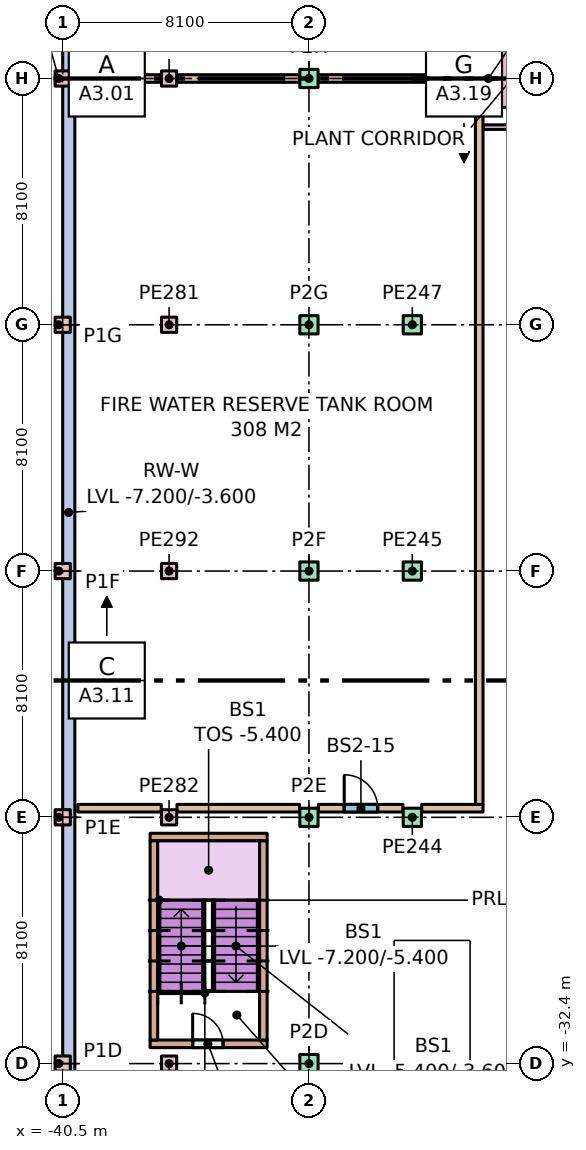
"""IFC4 building model, lengths in metres.
Left out: names, types, materials, properties, quantities, classifications, styles, units other than length and angle.
Written with IfcOpenShell. Run it as: python <this file> out.ifc"""

import sys

from ifc_helpers import new_model, si_unit, direction, frame, frame_2d, origin, origin_2d, place, context, subcontext, project, spatial, rectangle, extrude, element, fill, save


model = new_model("IFC4")
c1 = context("Model", 3, precision=1e-05, world=origin(), true_north=direction((0.0, 1.0)))
c2 = subcontext(c1, "Body", "Model", "MODEL_VIEW")
j1 = project(units=[si_unit("LENGTHUNIT", "METRE"), si_unit("PLANEANGLEUNIT", "RADIAN")], contexts=[c1])
p1 = place(None, origin())
s1 = spatial("IfcSite", under=j1, at=p1, CompositionType="ELEMENT")
p2 = place(p1, origin())
s2 = spatial("IfcBuilding", under=s1, at=p2, CompositionType="ELEMENT")
p3 = place(p2, frame((0.0, 0.0, -7.2)))
s3 = spatial("IfcBuildingStorey", under=s2, at=p3, CompositionType="ELEMENT", Elevation=-7.2)
p4 = place(p3, frame((-40.3, -56.3, 0.0), z_axis=(0.0, 0.0, 1.0), x_axis=(0.0, 1.0, 0.0)))
e1 = element("IfcWall", 1, at=p4, inside=s3, PredefinedType="SOLIDWALL", context=c2, shape_type="SweptSolid", body=[
    extrude(rectangle(XDim=112.6, YDim=0.4, at=frame_2d((56.3, 0.0))), origin(), (0.0, 0.0, 1.0), 3.6),
])
for number, where, z_axis, x_axis in (
    (2, (-40.5, -32.4, 0.0), (0.0, 0.0, 1.0), (1.0, 0.0, 0.0)),
    (3, (-40.5, -24.3, 0.0), (0.0, 0.0, 1.0), (1.0, 0.0, 0.0)),
    (4, (-40.5, -16.2, 0.0), (0.0, 0.0, 1.0), (1.0, 0.0, 0.0)),
    (5, (-40.5, -8.1, 0.0), (0.0, 0.0, 1.0), (1.0, 0.0, 0.0)),
    (6, (-40.5, 0.0, 0.0), (0.0, 0.0, 1.0), (1.0, 0.0, 0.0)),
):
    element("IfcColumn", number, at=place(p3, frame(where, z_axis=z_axis, x_axis=x_axis)), inside=s3, PredefinedType="COLUMN", context=c2, shape_type="SweptSolid", body=[
        extrude(rectangle(XDim=0.5, YDim=0.5, at=origin_2d()), origin(), (0.0, 0.0, 1.0), 3.6),
    ])
for number, where, z_axis, x_axis in (
    (7, (-32.4, -32.4, 0.0), (0.0, 0.0, 1.0), (1.0, 0.0, 0.0)),
    (8, (-32.4, -24.3, 0.0), (0.0, 0.0, 1.0), (1.0, 0.0, 0.0)),
    (9, (-32.4, -16.2, 0.0), (0.0, 0.0, 1.0), (1.0, 0.0, 0.0)),
    (10, (-32.4, -8.1, 0.0), (0.0, 0.0, 1.0), (1.0, 0.0, 0.0)),
    (11, (-32.4, 0.0, 0.0), (0.0, 0.0, 1.0), (1.0, 0.0, 0.0)),
    (12, (-29.0, -24.3, 0.0), (0.0, 0.0, 1.0), (1.0, 0.0, 0.0)),
    (13, (-29.0, -16.2, 0.0), (0.0, 0.0, 1.0), (1.0, 0.0, 0.0)),
    (14, (-29.0, -8.1, 0.0), (0.0, 0.0, 1.0), (1.0, 0.0, 0.0)),
):
    element("IfcColumn", number, at=place(p3, frame(where, z_axis=z_axis, x_axis=x_axis)), inside=s3, PredefinedType="COLUMN", context=c2, shape_type="SweptSolid", body=[
        extrude(rectangle(XDim=0.6, YDim=0.6, at=origin_2d()), origin(), (0.0, 0.0, 1.0), 3.6),
    ])
for number, where, z_axis, x_axis in (
    (15, (-37.0, 0.0, 0.0), (0.0, 0.0, 1.0), (1.0, 0.0, 0.0)),
    (16, (-37.0, -32.4, 0.0), (0.0, 0.0, 1.0), (1.0, 0.0, 0.0)),
    (17, (-37.0, -8.1, 0.0), (0.0, 0.0, 1.0), (1.0, 0.0, 0.0)),
    (18, (-37.0, -24.3, 0.0), (0.0, 0.0, 1.0), (1.0, 0.0, 0.0)),
    (19, (-37.0, -16.2, 0.0), (0.0, 0.0, 1.0), (1.0, 0.0, 0.0)),
):
    element("IfcColumn", number, at=place(p3, frame(where, z_axis=z_axis, x_axis=x_axis)), inside=s3, PredefinedType="COLUMN", context=c2, shape_type="SweptSolid", body=[
        extrude(rectangle(XDim=0.5, YDim=0.5, at=origin_2d()), origin(), (0.0, 0.0, 1.0), 3.6),
    ])
p5 = place(p3, frame((-26.5, 0.0, 0.0), z_axis=(0.0, 0.0, 1.0), x_axis=(0.0, -1.0, 0.0)))
e20 = element("IfcColumn", 20, at=p5, inside=s3, PredefinedType="COLUMN", context=c2, shape_type="SweptSolid", body=[
    extrude(rectangle(XDim=1.9, YDim=1.9, at=origin_2d()), origin(), (0.0, 0.0, 1.0), 3.6),
])
p6 = place(p3, frame((-37.625, -31.75, 0.0), z_axis=(0.0, 0.0, 1.0), x_axis=(1.0, 0.0, 0.0)))
e21 = element("IfcWall", 21, at=p6, inside=s3, PredefinedType="STANDARD", context=c2, shape_type="SweptSolid", body=[
    extrude(rectangle(XDim=3.85, YDim=0.25, at=frame_2d((1.925, 0.0))), origin(), (0.0, 0.0, 1.0), 3.28),
])
p7 = place(p6, frame((1.4, 0.0, 0.0)))
e22 = element("IfcOpeningElement", 22, at=p7, cuts=e21, PredefinedType="OPENING", context=c2, shape_type="SweptSolid", body=[
    extrude(rectangle(XDim=1.0, YDim=2.1, at=frame_2d((0.5, 1.05))), frame((0.0, 0.135, 0.0), z_axis=(0.0, -1.0, 0.0), x_axis=(1.0, 0.0, 0.0)), (0.0, 0.0, 1.0), 0.27),
])
p8 = place(p3, frame((-37.625, -24.95, 0.0), z_axis=(0.0, 0.0, 1.0), x_axis=(1.0, 0.0, 0.0)))
e23 = element("IfcWall", 23, at=p8, inside=s3, PredefinedType="STANDARD", context=c2, shape_type="SweptSolid", body=[
    extrude(rectangle(XDim=3.85, YDim=0.25, at=frame_2d((1.925, 0.0))), origin(), (0.0, 0.0, 1.0), 3.28),
])
for number, where, z_axis, x_axis in (
    (24, (-37.5, -31.625, 0.0), (0.0, 0.0, 1.0), (0.0, 1.0, 0.0)),
    (25, (-33.9, -31.625, 0.0), (0.0, 0.0, 1.0), (0.0, 1.0, 0.0)),
):
    element("IfcWall", number, at=place(p3, frame(where, z_axis=z_axis, x_axis=x_axis)), inside=s3, PredefinedType="STANDARD", context=c2, shape_type="SweptSolid", body=[
        extrude(rectangle(XDim=6.55, YDim=0.25, at=frame_2d((3.275, 0.0))), origin(), (0.0, 0.0, 1.0), 3.28),
    ])
p9 = place(p3, frame((-26.675, -1.6, 0.0), z_axis=(0.0, 0.0, 1.0), x_axis=(1.0, 0.0, 0.0)))
e26 = element("IfcWall", 26, at=p9, inside=s3, PredefinedType="PARTITIONING", context=c2, shape_type="SweptSolid", body=[
    extrude(rectangle(XDim=3.2, YDim=0.15, at=frame_2d((1.6, 0.0))), origin(), (0.0, 0.0, 1.0), 3.28),
])
p10 = place(p3, frame((-40.0, -24.0, 0.0), z_axis=(0.0, 0.0, 1.0), x_axis=(1.0, 0.0, 0.0)))
e27 = element("IfcWall", 27, at=p10, inside=s3, PredefinedType="PARTITIONING", context=c2, shape_type="SweptSolid", body=[
    extrude(rectangle(XDim=2.74, YDim=0.25, at=frame_2d((1.37, 0.0))), origin(), (0.0, 0.0, 1.0), 3.28),
])
p11 = place(p3, frame((-36.74, -24.0, 0.0), z_axis=(0.0, 0.0, 1.0), x_axis=(1.0, 0.0, 0.0)))
e28 = element("IfcWall", 28, at=p11, inside=s3, PredefinedType="PARTITIONING", context=c2, shape_type="SweptSolid", body=[
    extrude(rectangle(XDim=4.03, YDim=0.25, at=frame_2d((2.015, 0.0))), origin(), (0.0, 0.0, 1.0), 3.28),
])
p12 = place(p3, frame((-32.09, -24.0, 0.0), z_axis=(0.0, 0.0, 1.0), x_axis=(1.0, 0.0, 0.0)))
e29 = element("IfcWall", 29, at=p12, inside=s3, PredefinedType="PARTITIONING", context=c2, shape_type="SweptSolid", body=[
    extrude(rectangle(XDim=2.78, YDim=0.25, at=frame_2d((1.39, 0.0))), origin(), (0.0, 0.0, 1.0), 3.28),
])
p13 = place(p12, frame((0.85, 0.0, 0.0)))
e30 = element("IfcOpeningElement", 30, at=p13, cuts=e29, PredefinedType="OPENING", context=c2, shape_type="SweptSolid", body=[
    extrude(rectangle(XDim=1.1, YDim=2.1, at=frame_2d((0.55, 1.05))), frame((0.0, 0.135, 0.0), z_axis=(0.0, -1.0, 0.0), x_axis=(1.0, 0.0, 0.0)), (0.0, 0.0, 1.0), 0.27),
])
p14 = place(p3, frame((-28.69, -24.0, 0.0), z_axis=(0.0, 0.0, 1.0), x_axis=(1.0, 0.0, 0.0)))
e31 = element("IfcWall", 31, at=p14, inside=s3, PredefinedType="PARTITIONING", context=c2, shape_type="SweptSolid", body=[
    extrude(rectangle(XDim=2.015, YDim=0.25, at=frame_2d((1.007, 0.0))), origin(), (0.0, 0.0, 1.0), 3.28),
])
p15 = place(p3, frame((-26.8, -23.875, 0.0), z_axis=(0.0, 0.0, 1.0), x_axis=(0.0, 1.0, 0.0)))
e32 = element("IfcWall", 32, at=p15, inside=s3, PredefinedType="PARTITIONING", context=c2, shape_type="SweptSolid", body=[
    extrude(rectangle(XDim=22.915, YDim=0.25, at=frame_2d((11.458, 0.0))), origin(), (0.0, 0.0, 1.0), 3.28),
])
p16 = place(p3, frame((-40.0, 0.0, 0.0), z_axis=(0.0, 0.0, 1.0), x_axis=(1.0, 0.0, 0.0)))
e33 = element("IfcWall", 33, at=p16, inside=s3, PredefinedType="PARTITIONING", context=c2, shape_type="SweptSolid", body=[
    extrude(rectangle(XDim=2.74, YDim=0.25, at=frame_2d((1.37, 0.0))), origin(), (0.0, 0.0, 1.0), 3.28),
])
p17 = place(p3, frame((-36.74, 0.0, 0.0), z_axis=(0.0, 0.0, 1.0), x_axis=(1.0, 0.0, 0.0)))
e34 = element("IfcWall", 34, at=p17, inside=s3, PredefinedType="PARTITIONING", context=c2, shape_type="SweptSolid", body=[
    extrude(rectangle(XDim=4.03, YDim=0.25, at=frame_2d((2.015, 0.0))), origin(), (0.0, 0.0, 1.0), 3.28),
])
p18 = place(p3, frame((-32.09, 0.0, 0.0), z_axis=(0.0, 0.0, 1.0), x_axis=(1.0, 0.0, 0.0)))
e35 = element("IfcWall", 35, at=p18, inside=s3, PredefinedType="PARTITIONING", context=c2, shape_type="SweptSolid", body=[
    extrude(rectangle(XDim=4.63, YDim=0.25, at=frame_2d((2.315, 0.0))), origin(), (0.0, 0.0, 1.0), 3.28),
])
p19 = place(p7, origin())
e36 = element("IfcDoor", 36, at=p19, inside=s3, OperationType="SINGLE_SWING_LEFT", PredefinedType="DOOR", context=c2, shape_type="SweptSolid", body=[
    extrude(rectangle(XDim=1.0, YDim=2.1, at=frame_2d((0.5, 1.05))), frame((0.0, 0.025, 0.0), z_axis=(0.0, -1.0, 0.0), x_axis=(1.0, 0.0, 0.0)), (0.0, 0.0, 1.0), 0.05),
])
fill(e22, e36)
p20 = place(p13, origin())
e37 = element("IfcDoor", 37, at=p20, inside=s3, OperationType="SINGLE_SWING_LEFT", PredefinedType="DOOR", context=c2, shape_type="SweptSolid", body=[
    extrude(rectangle(XDim=1.1, YDim=2.1, at=frame_2d((0.55, 1.05))), frame((0.0, 0.025, 0.0), z_axis=(0.0, -1.0, 0.0), x_axis=(1.0, 0.0, 0.0)), (0.0, 0.0, 1.0), 0.05),
])
fill(e30, e37)
save(model, sys.argv[1])
